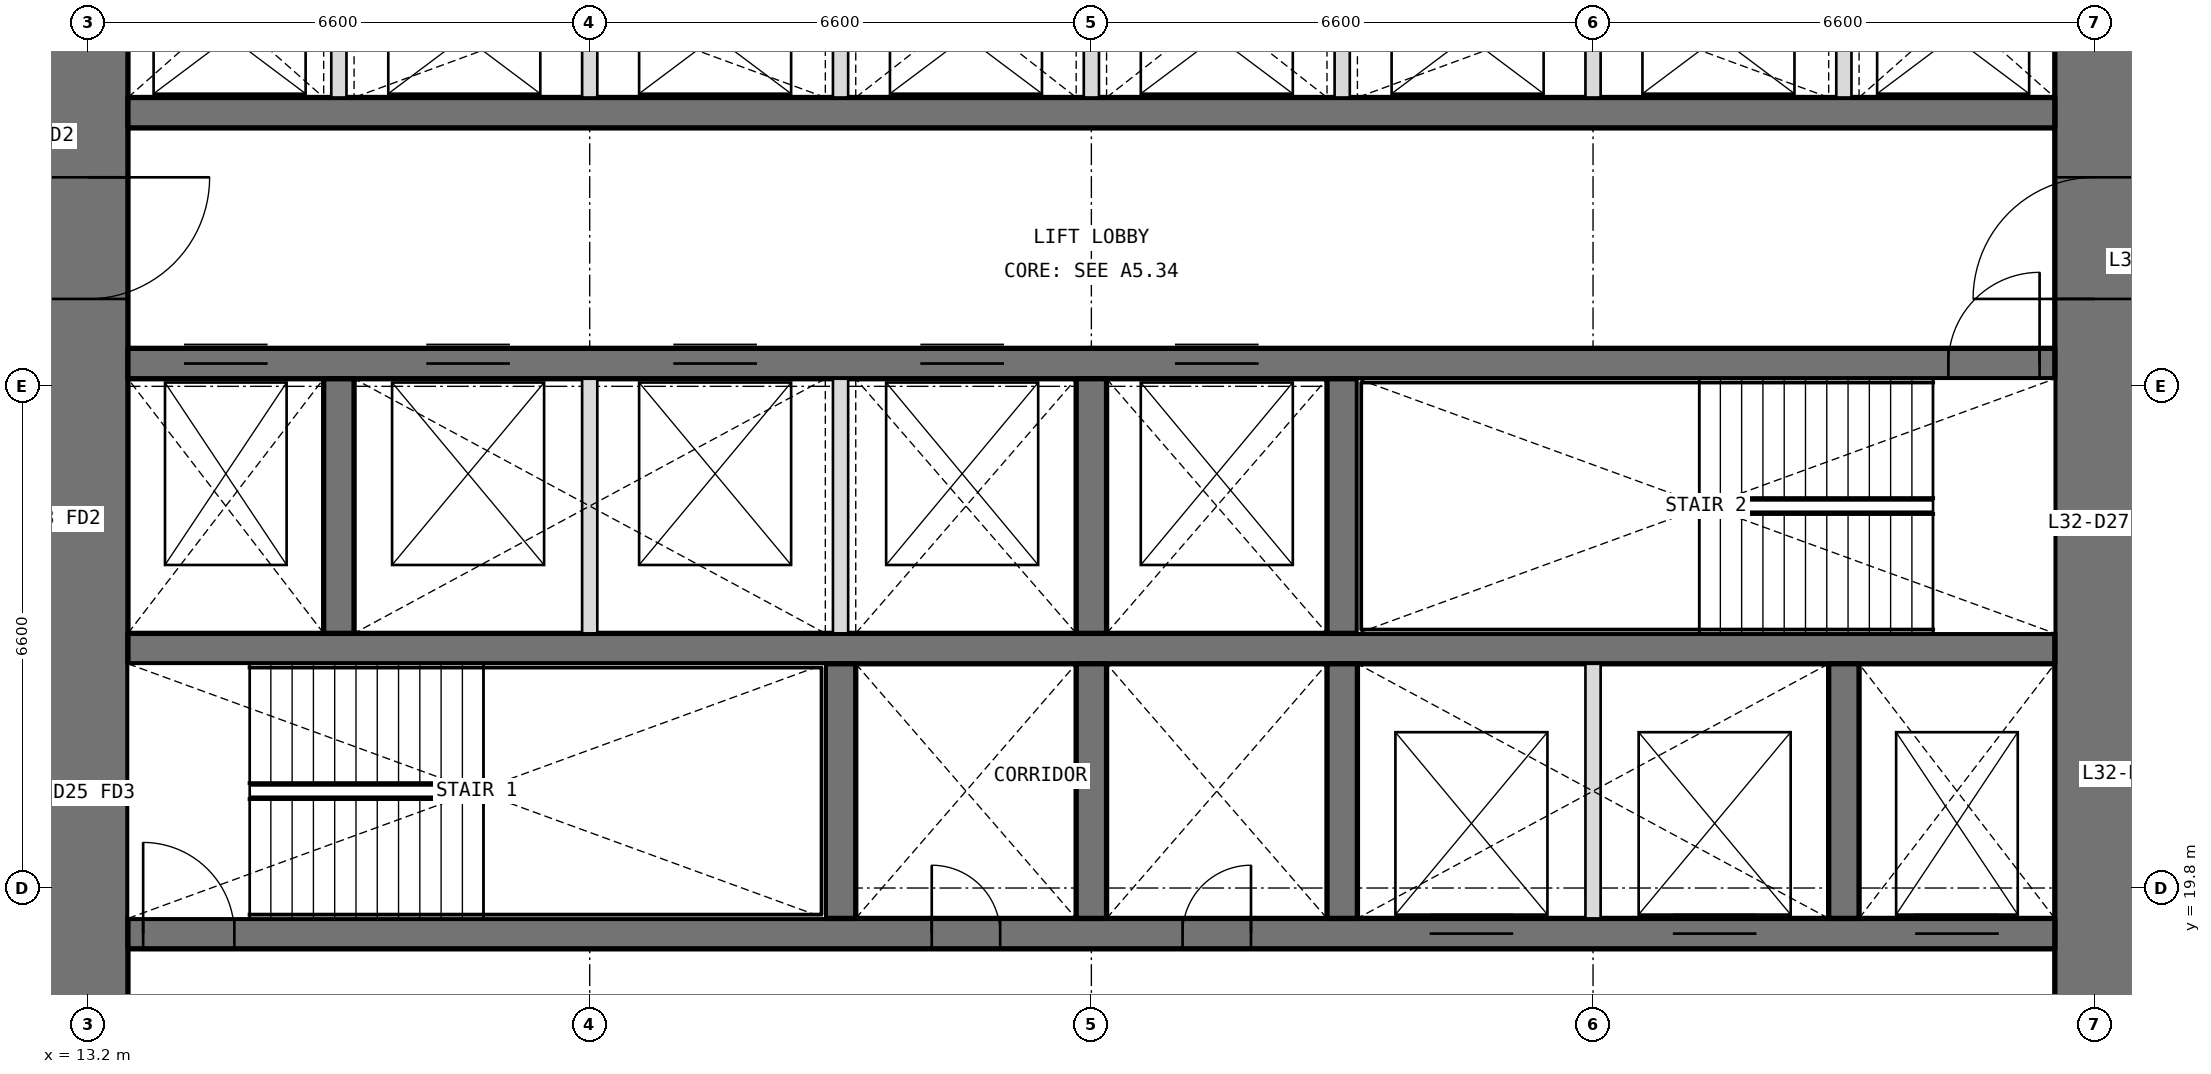
"""IFC4 building model, lengths in metres.
Left out: names, types, materials, properties, quantities, classifications, styles, units other than length and angle.
Written with IfcOpenShell. Run it as: python <this file> out.ifc"""

import sys

from ifc_helpers import new_model, si_unit, direction, frame, frame_2d, origin, place, context, subcontext, project, spatial, rectangle, extrude, element, fill, save


model = new_model("IFC4")
c1 = context("Model", 3, precision=1e-05, world=origin(), true_north=direction((0.0, 1.0)))
c2 = subcontext(c1, "Body", "Model", "MODEL_VIEW")
j1 = project(units=[si_unit("LENGTHUNIT", "METRE"), si_unit("PLANEANGLEUNIT", "RADIAN")], contexts=[c1])
p1 = place(None, origin())
s1 = spatial("IfcSite", under=j1, at=p1, CompositionType="ELEMENT")
p2 = place(p1, origin())
s2 = spatial("IfcBuilding", under=s1, at=p2, CompositionType="ELEMENT")
p3 = place(p2, frame((0.0, 0.0, 141.0)))
s3 = spatial("IfcBuildingStorey", under=s2, at=p3, CompositionType="ELEMENT", Elevation=141.0)
p4 = place(p3, frame((39.6, 13.725, 0.0), z_axis=(0.0, 0.0, 1.0), x_axis=(0.0, 1.0, 0.0)))
e1 = element("IfcWall", 1, at=p4, inside=s3, PredefinedType="SHEAR", context=c2, shape_type="SweptSolid", body=[
    extrude(rectangle(XDim=18.75, YDim=1.05, at=frame_2d((9.375, 0.0))), origin(), (0.0, 0.0, 1.0), 4.2),
])
p5 = place(p4, frame((3.025, 0.0, 0.0)))
e2 = element("IfcOpeningElement", 2, at=p5, cuts=e1, PredefinedType="OPENING", context=c2, shape_type="SweptSolid", body=[
    extrude(rectangle(XDim=1.6, YDim=2.1, at=frame_2d((0.8, 1.05))), frame((0.0, 0.535, 0.0), z_axis=(0.0, -1.0, 0.0), x_axis=(1.0, 0.0, 0.0)), (0.0, 0.0, 1.0), 1.07),
])
p6 = place(p4, frame((13.825, 0.0, 0.0)))
e3 = element("IfcOpeningElement", 3, at=p6, cuts=e1, PredefinedType="OPENING", context=c2, shape_type="SweptSolid", body=[
    extrude(rectangle(XDim=1.6, YDim=2.1, at=frame_2d((0.8, 1.05))), frame((0.0, 0.535, 0.0), z_axis=(0.0, -1.0, 0.0), x_axis=(1.0, 0.0, 0.0)), (0.0, 0.0, 1.0), 1.07),
])
p7 = place(p3, frame((13.2, 32.475, 0.0), z_axis=(0.0, 0.0, 1.0), x_axis=(0.0, -1.0, 0.0)))
e4 = element("IfcWall", 4, at=p7, inside=s3, PredefinedType="SHEAR", context=c2, shape_type="SweptSolid", body=[
    extrude(rectangle(XDim=18.75, YDim=1.05, at=frame_2d((9.375, 0.0))), origin(), (0.0, 0.0, 1.0), 4.2),
])
p8 = place(p7, frame((14.125, 0.0, 0.0)))
e5 = element("IfcOpeningElement", 5, at=p8, cuts=e4, PredefinedType="OPENING", context=c2, shape_type="SweptSolid", body=[
    extrude(rectangle(XDim=1.6, YDim=2.1, at=frame_2d((0.8, 1.05))), frame((0.0, 0.535, 0.0), z_axis=(0.0, -1.0, 0.0), x_axis=(1.0, 0.0, 0.0)), (0.0, 0.0, 1.0), 1.07),
])
p9 = place(p7, frame((3.325, 0.0, 0.0)))
e6 = element("IfcOpeningElement", 6, at=p9, cuts=e4, PredefinedType="OPENING", context=c2, shape_type="SweptSolid", body=[
    extrude(rectangle(XDim=1.6, YDim=2.1, at=frame_2d((0.8, 1.05))), frame((0.0, 0.535, 0.0), z_axis=(0.0, -1.0, 0.0), x_axis=(1.0, 0.0, 0.0)), (0.0, 0.0, 1.0), 1.07),
])
p10 = place(p3, frame((13.725, 19.2, 0.0), z_axis=(0.0, 0.0, 1.0), x_axis=(1.0, 0.0, 0.0)))
e7 = element("IfcWall", 7, at=p10, inside=s3, PredefinedType="SHEAR", context=c2, shape_type="SweptSolid", body=[
    extrude(rectangle(XDim=25.35, YDim=0.4, at=frame_2d((12.675, 0.0))), origin(), (0.0, 0.0, 1.0), 4.2),
])
p11 = place(p10, frame((10.575, 0.0, 0.0)))
e8 = element("IfcOpeningElement", 8, at=p11, cuts=e7, PredefinedType="OPENING", context=c2, shape_type="SweptSolid", body=[
    extrude(rectangle(XDim=0.9, YDim=2.1, at=frame_2d((0.45, 1.05))), frame((0.0, 0.21, 0.0), z_axis=(0.0, -1.0, 0.0), x_axis=(1.0, 0.0, 0.0)), (0.0, 0.0, 1.0), 0.42),
])
p12 = place(p10, frame((13.875, 0.0, 0.0)))
e9 = element("IfcOpeningElement", 9, at=p12, cuts=e7, PredefinedType="OPENING", context=c2, shape_type="SweptSolid", body=[
    extrude(rectangle(XDim=0.9, YDim=2.1, at=frame_2d((0.45, 1.05))), frame((0.0, 0.21, 0.0), z_axis=(0.0, -1.0, 0.0), x_axis=(1.0, 0.0, 0.0)), (0.0, 0.0, 1.0), 0.42),
])
p13 = place(p10, frame((0.2, 0.0, 0.0)))
e10 = element("IfcOpeningElement", 10, at=p13, cuts=e7, PredefinedType="OPENING", context=c2, shape_type="SweptSolid", body=[
    extrude(rectangle(XDim=1.2, YDim=2.1, at=frame_2d((0.6, 1.05))), frame((0.0, 0.21, 0.0), z_axis=(0.0, -1.0, 0.0), x_axis=(1.0, 0.0, 0.0)), (0.0, 0.0, 1.0), 0.42),
])
p14 = place(p10, frame((23.512, 0.0, 0.0)))
e11 = element("IfcOpeningElement", 11, at=p14, cuts=e7, PredefinedType="OPENING", context=c2, shape_type="SweptSolid", body=[
    extrude(rectangle(XDim=1.1, YDim=2.1, at=frame_2d((0.55, 1.05))), frame((0.0, 0.21, 0.0), z_axis=(0.0, -1.0, 0.0), x_axis=(1.0, 0.0, 0.0)), (0.0, 0.0, 1.0), 0.42),
])
p15 = place(p10, frame((17.125, 0.0, 0.0)))
e12 = element("IfcOpeningElement", 12, at=p15, cuts=e7, PredefinedType="OPENING", context=c2, shape_type="SweptSolid", body=[
    extrude(rectangle(XDim=1.1, YDim=2.1, at=frame_2d((0.55, 1.05))), frame((0.0, 0.21, 0.0), z_axis=(0.0, -1.0, 0.0), x_axis=(1.0, 0.0, 0.0)), (0.0, 0.0, 1.0), 0.42),
])
p16 = place(p10, frame((20.325, 0.0, 0.0)))
e13 = element("IfcOpeningElement", 13, at=p16, cuts=e7, PredefinedType="OPENING", context=c2, shape_type="SweptSolid", body=[
    extrude(rectangle(XDim=1.1, YDim=2.1, at=frame_2d((0.55, 1.05))), frame((0.0, 0.21, 0.0), z_axis=(0.0, -1.0, 0.0), x_axis=(1.0, 0.0, 0.0)), (0.0, 0.0, 1.0), 0.42),
])
p17 = place(p3, frame((13.725, 22.95, 0.0), z_axis=(0.0, 0.0, 1.0), x_axis=(1.0, 0.0, 0.0)))
e14 = element("IfcWall", 14, at=p17, inside=s3, PredefinedType="SHEAR", context=c2, shape_type="SweptSolid", body=[
    extrude(rectangle(XDim=25.35, YDim=0.4, at=frame_2d((12.675, 0.0))), origin(), (0.0, 0.0, 1.0), 4.2),
])
p18 = place(p3, frame((13.725, 26.7, 0.0), z_axis=(0.0, 0.0, 1.0), x_axis=(1.0, 0.0, 0.0)))
e15 = element("IfcWall", 15, at=p18, inside=s3, PredefinedType="SHEAR", context=c2, shape_type="SweptSolid", body=[
    extrude(rectangle(XDim=25.35, YDim=0.4, at=frame_2d((12.675, 0.0))), origin(), (0.0, 0.0, 1.0), 4.2),
])
p19 = place(p18, frame((23.95, 0.0, 0.0)))
e16 = element("IfcOpeningElement", 16, at=p19, cuts=e15, PredefinedType="OPENING", context=c2, shape_type="SweptSolid", body=[
    extrude(rectangle(XDim=1.2, YDim=2.1, at=frame_2d((0.6, 1.05))), frame((0.0, 0.21, 0.0), z_axis=(0.0, -1.0, 0.0), x_axis=(1.0, 0.0, 0.0)), (0.0, 0.0, 1.0), 0.42),
])
p20 = place(p18, frame((0.738, 0.0, 0.0)))
e17 = element("IfcOpeningElement", 17, at=p20, cuts=e15, PredefinedType="OPENING", context=c2, shape_type="SweptSolid", body=[
    extrude(rectangle(XDim=1.1, YDim=2.1, at=frame_2d((0.55, 1.05))), frame((0.0, 0.21, 0.0), z_axis=(0.0, -1.0, 0.0), x_axis=(1.0, 0.0, 0.0)), (0.0, 0.0, 1.0), 0.42),
])
p21 = place(p18, frame((3.925, 0.0, 0.0)))
e18 = element("IfcOpeningElement", 18, at=p21, cuts=e15, PredefinedType="OPENING", context=c2, shape_type="SweptSolid", body=[
    extrude(rectangle(XDim=1.1, YDim=2.1, at=frame_2d((0.55, 1.05))), frame((0.0, 0.21, 0.0), z_axis=(0.0, -1.0, 0.0), x_axis=(1.0, 0.0, 0.0)), (0.0, 0.0, 1.0), 0.42),
])
p22 = place(p18, frame((7.175, 0.0, 0.0)))
e19 = element("IfcOpeningElement", 19, at=p22, cuts=e15, PredefinedType="OPENING", context=c2, shape_type="SweptSolid", body=[
    extrude(rectangle(XDim=1.1, YDim=2.1, at=frame_2d((0.55, 1.05))), frame((0.0, 0.21, 0.0), z_axis=(0.0, -1.0, 0.0), x_axis=(1.0, 0.0, 0.0)), (0.0, 0.0, 1.0), 0.42),
])
p23 = place(p18, frame((10.425, 0.0, 0.0)))
e20 = element("IfcOpeningElement", 20, at=p23, cuts=e15, PredefinedType="OPENING", context=c2, shape_type="SweptSolid", body=[
    extrude(rectangle(XDim=1.1, YDim=2.1, at=frame_2d((0.55, 1.05))), frame((0.0, 0.21, 0.0), z_axis=(0.0, -1.0, 0.0), x_axis=(1.0, 0.0, 0.0)), (0.0, 0.0, 1.0), 0.42),
])
p24 = place(p18, frame((13.775, 0.0, 0.0)))
e21 = element("IfcOpeningElement", 21, at=p24, cuts=e15, PredefinedType="OPENING", context=c2, shape_type="SweptSolid", body=[
    extrude(rectangle(XDim=1.1, YDim=2.1, at=frame_2d((0.55, 1.05))), frame((0.0, 0.21, 0.0), z_axis=(0.0, -1.0, 0.0), x_axis=(1.0, 0.0, 0.0)), (0.0, 0.0, 1.0), 0.42),
])
p25 = place(p3, frame((13.725, 30.0, 0.0), z_axis=(0.0, 0.0, 1.0), x_axis=(1.0, 0.0, 0.0)))
e22 = element("IfcWall", 22, at=p25, inside=s3, PredefinedType="SHEAR", context=c2, shape_type="SweptSolid", body=[
    extrude(rectangle(XDim=25.35, YDim=0.4, at=frame_2d((12.675, 0.0))), origin(), (0.0, 0.0, 1.0), 4.2),
])
for number, where, z_axis, x_axis in (
    (23, (23.1, 19.4, 0.0), (0.0, 0.0, 1.0), (0.0, 1.0, 0.0)),
    (24, (26.4, 19.4, 0.0), (0.0, 0.0, 1.0), (0.0, 1.0, 0.0)),
    (25, (29.7, 19.4, 0.0), (0.0, 0.0, 1.0), (0.0, 1.0, 0.0)),
    (26, (36.3, 19.4, 0.0), (0.0, 0.0, 1.0), (0.0, 1.0, 0.0)),
    (27, (16.5, 23.15, 0.0), (0.0, 0.0, 1.0), (0.0, 1.0, 0.0)),
    (28, (26.4, 23.15, 0.0), (0.0, 0.0, 1.0), (0.0, 1.0, 0.0)),
    (29, (29.7, 23.15, 0.0), (0.0, 0.0, 1.0), (0.0, 1.0, 0.0)),
):
    element("IfcWall", number, at=place(p3, frame(where, z_axis=z_axis, x_axis=x_axis)), inside=s3, PredefinedType="SHEAR", context=c2, shape_type="SweptSolid", body=[
        extrude(rectangle(XDim=3.35, YDim=0.4, at=frame_2d((1.675, 0.0))), origin(), (0.0, 0.0, 1.0), 4.2),
    ])
for number, where, z_axis, x_axis in (
    (30, (16.5, 30.2, 0.0), (0.0, 0.0, 1.0), (0.0, 1.0, 0.0)),
    (31, (19.8, 30.2, 0.0), (0.0, 0.0, 1.0), (0.0, 1.0, 0.0)),
    (32, (23.1, 30.2, 0.0), (0.0, 0.0, 1.0), (0.0, 1.0, 0.0)),
    (33, (26.4, 30.2, 0.0), (0.0, 0.0, 1.0), (0.0, 1.0, 0.0)),
    (34, (29.7, 30.2, 0.0), (0.0, 0.0, 1.0), (0.0, 1.0, 0.0)),
    (35, (33.0, 30.2, 0.0), (0.0, 0.0, 1.0), (0.0, 1.0, 0.0)),
    (36, (36.3, 30.2, 0.0), (0.0, 0.0, 1.0), (0.0, 1.0, 0.0)),
):
    element("IfcWall", number, at=place(p3, frame(where, z_axis=z_axis, x_axis=x_axis)), inside=s3, PredefinedType="PARTITIONING", context=c2, shape_type="SweptSolid", body=[
        extrude(rectangle(XDim=2.275, YDim=0.2, at=frame_2d((1.138, 0.0))), origin(), (0.0, 0.0, 1.0), 4.2),
    ])
for number, where, z_axis, x_axis in (
    (37, (33.0, 19.4, 0.0), (0.0, 0.0, 1.0), (0.0, 1.0, 0.0)),
    (38, (19.8, 23.15, 0.0), (0.0, 0.0, 1.0), (0.0, 1.0, 0.0)),
    (39, (23.1, 23.15, 0.0), (0.0, 0.0, 1.0), (0.0, 1.0, 0.0)),
):
    element("IfcWall", number, at=place(p3, frame(where, z_axis=z_axis, x_axis=x_axis)), inside=s3, PredefinedType="PARTITIONING", context=c2, shape_type="SweptSolid", body=[
        extrude(rectangle(XDim=3.35, YDim=0.2, at=frame_2d((1.675, 0.0))), origin(), (0.0, 0.0, 1.0), 4.2),
    ])
p26 = place(p11, origin())
e40 = element("IfcDoor", 40, at=p26, inside=s3, OperationType="SINGLE_SWING_LEFT", PredefinedType="DOOR", context=c2, shape_type="SweptSolid", body=[
    extrude(rectangle(XDim=0.9, YDim=2.1, at=frame_2d((0.45, 1.05))), frame((0.0, 0.025, 0.0), z_axis=(0.0, -1.0, 0.0), x_axis=(1.0, 0.0, 0.0)), (0.0, 0.0, 1.0), 0.05),
])
fill(e8, e40)
p27 = place(p12, origin())
e41 = element("IfcDoor", 41, at=p27, inside=s3, OperationType="SINGLE_SWING_RIGHT", PredefinedType="DOOR", context=c2, shape_type="SweptSolid", body=[
    extrude(rectangle(XDim=0.9, YDim=2.1, at=frame_2d((0.45, 1.05))), frame((0.0, 0.025, 0.0), z_axis=(0.0, -1.0, 0.0), x_axis=(1.0, 0.0, 0.0)), (0.0, 0.0, 1.0), 0.05),
])
fill(e9, e41)
p28 = place(p13, origin())
e42 = element("IfcDoor", 42, at=p28, inside=s3, OperationType="SINGLE_SWING_LEFT", PredefinedType="DOOR", context=c2, shape_type="SweptSolid", body=[
    extrude(rectangle(XDim=1.2, YDim=2.1, at=frame_2d((0.6, 1.05))), frame((0.0, 0.025, 0.0), z_axis=(0.0, -1.0, 0.0), x_axis=(1.0, 0.0, 0.0)), (0.0, 0.0, 1.0), 0.05),
])
fill(e10, e42)
p29 = place(p19, origin())
e43 = element("IfcDoor", 43, at=p29, inside=s3, OperationType="SINGLE_SWING_RIGHT", PredefinedType="DOOR", context=c2, shape_type="SweptSolid", body=[
    extrude(rectangle(XDim=1.2, YDim=2.1, at=frame_2d((0.6, 1.05))), frame((0.0, 0.025, 0.0), z_axis=(0.0, -1.0, 0.0), x_axis=(1.0, 0.0, 0.0)), (0.0, 0.0, 1.0), 0.05),
])
fill(e16, e43)
p30 = place(p9, origin())
e44 = element("IfcDoor", 44, at=p30, inside=s3, OperationType="DOUBLE_DOOR_DOUBLE_SWING", PredefinedType="DOOR", context=c2, shape_type="SweptSolid", body=[
    extrude(rectangle(XDim=1.6, YDim=2.1, at=frame_2d((0.8, 1.05))), frame((0.0, 0.025, 0.0), z_axis=(0.0, -1.0, 0.0), x_axis=(1.0, 0.0, 0.0)), (0.0, 0.0, 1.0), 0.05),
])
fill(e6, e44)
p31 = place(p6, origin())
e45 = element("IfcDoor", 45, at=p31, inside=s3, OperationType="DOUBLE_DOOR_DOUBLE_SWING", PredefinedType="DOOR", context=c2, shape_type="SweptSolid", body=[
    extrude(rectangle(XDim=1.6, YDim=2.1, at=frame_2d((0.8, 1.05))), frame((0.0, 0.025, 0.0), z_axis=(0.0, -1.0, 0.0), x_axis=(1.0, 0.0, 0.0)), (0.0, 0.0, 1.0), 0.05),
])
fill(e3, e45)
p32 = place(p20, origin())
e46 = element("IfcDoor", 46, at=p32, inside=s3, OperationType="DOUBLE_DOOR_SLIDING", PredefinedType="DOOR", context=c2, shape_type="SweptSolid", body=[
    extrude(rectangle(XDim=1.1, YDim=2.1, at=frame_2d((0.55, 1.05))), frame((0.0, 0.025, 0.0), z_axis=(0.0, -1.0, 0.0), x_axis=(1.0, 0.0, 0.0)), (0.0, 0.0, 1.0), 0.05),
])
fill(e17, e46)
p33 = place(p14, origin())
e47 = element("IfcDoor", 47, at=p33, inside=s3, OperationType="DOUBLE_DOOR_SLIDING", PredefinedType="DOOR", context=c2, shape_type="SweptSolid", body=[
    extrude(rectangle(XDim=1.1, YDim=2.1, at=frame_2d((0.55, 1.05))), frame((0.0, 0.025, 0.0), z_axis=(0.0, -1.0, 0.0), x_axis=(1.0, 0.0, 0.0)), (0.0, 0.0, 1.0), 0.05),
])
fill(e11, e47)
p34 = place(p15, origin())
e48 = element("IfcDoor", 48, at=p34, inside=s3, OperationType="DOUBLE_DOOR_SLIDING", PredefinedType="DOOR", context=c2, shape_type="SweptSolid", body=[
    extrude(rectangle(XDim=1.1, YDim=2.1, at=frame_2d((0.55, 1.05))), frame((0.0, 0.025, 0.0), z_axis=(0.0, -1.0, 0.0), x_axis=(1.0, 0.0, 0.0)), (0.0, 0.0, 1.0), 0.05),
])
fill(e12, e48)
p35 = place(p16, origin())
e49 = element("IfcDoor", 49, at=p35, inside=s3, OperationType="DOUBLE_DOOR_SLIDING", PredefinedType="DOOR", context=c2, shape_type="SweptSolid", body=[
    extrude(rectangle(XDim=1.1, YDim=2.1, at=frame_2d((0.55, 1.05))), frame((0.0, 0.025, 0.0), z_axis=(0.0, -1.0, 0.0), x_axis=(1.0, 0.0, 0.0)), (0.0, 0.0, 1.0), 0.05),
])
fill(e13, e49)
p36 = place(p21, origin())
e50 = element("IfcDoor", 50, at=p36, inside=s3, OperationType="DOUBLE_DOOR_SLIDING", PredefinedType="DOOR", context=c2, shape_type="SweptSolid", body=[
    extrude(rectangle(XDim=1.1, YDim=2.1, at=frame_2d((0.55, 1.05))), frame((0.0, 0.025, 0.0), z_axis=(0.0, -1.0, 0.0), x_axis=(1.0, 0.0, 0.0)), (0.0, 0.0, 1.0), 0.05),
])
fill(e18, e50)
p37 = place(p22, origin())
e51 = element("IfcDoor", 51, at=p37, inside=s3, OperationType="DOUBLE_DOOR_SLIDING", PredefinedType="DOOR", context=c2, shape_type="SweptSolid", body=[
    extrude(rectangle(XDim=1.1, YDim=2.1, at=frame_2d((0.55, 1.05))), frame((0.0, 0.025, 0.0), z_axis=(0.0, -1.0, 0.0), x_axis=(1.0, 0.0, 0.0)), (0.0, 0.0, 1.0), 0.05),
])
fill(e19, e51)
p38 = place(p23, origin())
e52 = element("IfcDoor", 52, at=p38, inside=s3, OperationType="DOUBLE_DOOR_SLIDING", PredefinedType="DOOR", context=c2, shape_type="SweptSolid", body=[
    extrude(rectangle(XDim=1.1, YDim=2.1, at=frame_2d((0.55, 1.05))), frame((0.0, 0.025, 0.0), z_axis=(0.0, -1.0, 0.0), x_axis=(1.0, 0.0, 0.0)), (0.0, 0.0, 1.0), 0.05),
])
fill(e20, e52)
p39 = place(p24, origin())
e53 = element("IfcDoor", 53, at=p39, inside=s3, OperationType="DOUBLE_DOOR_SLIDING", PredefinedType="DOOR", context=c2, shape_type="SweptSolid", body=[
    extrude(rectangle(XDim=1.1, YDim=2.1, at=frame_2d((0.55, 1.05))), frame((0.0, 0.025, 0.0), z_axis=(0.0, -1.0, 0.0), x_axis=(1.0, 0.0, 0.0)), (0.0, 0.0, 1.0), 0.05),
])
fill(e21, e53)
save(model, sys.argv[1])
